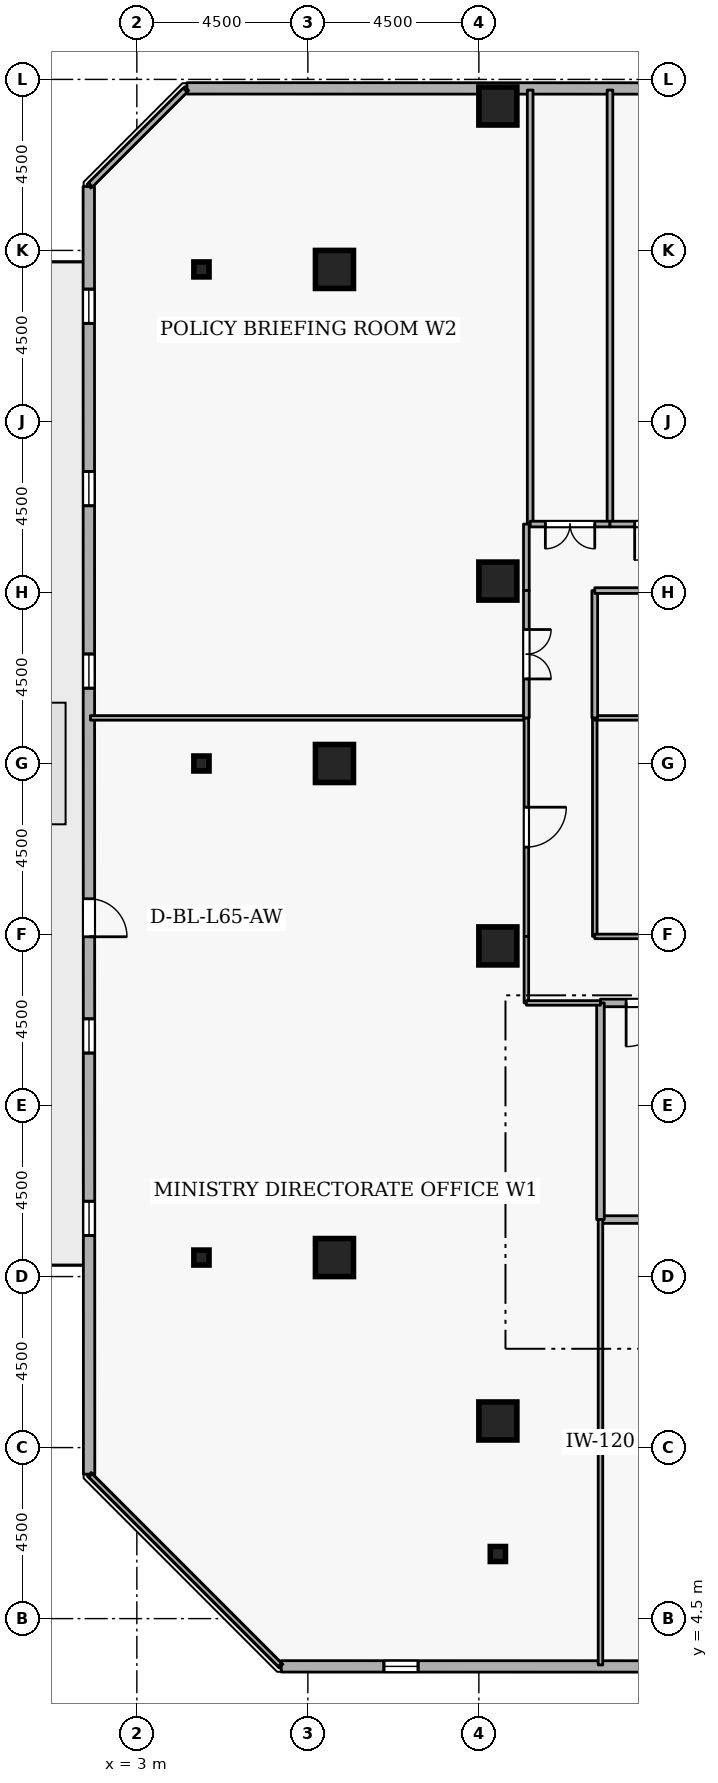
"""IFC4 building model, lengths in metres.
Left out: names, types, materials, properties, quantities, classifications, styles, units other than length and angle.
Written with IfcOpenShell. Run it as: python <this file> out.ifc"""

import sys

from ifc_helpers import new_model, si_unit, direction, frame, frame_2d, origin, origin_2d, place, context, subcontext, project, spatial, rectangle, i_section, extrude, element, fill, save


model = new_model("IFC4")
c1 = context("Model", 3, precision=1e-05, world=origin(), true_north=direction((0.0, 1.0)))
c2 = subcontext(c1, "Body", "Model", "MODEL_VIEW")
j1 = project(units=[si_unit("LENGTHUNIT", "METRE"), si_unit("PLANEANGLEUNIT", "RADIAN")], contexts=[c1])
p1 = place(None, origin())
s1 = spatial("IfcSite", under=j1, at=p1, CompositionType="ELEMENT")
p2 = place(p1, origin())
s2 = spatial("IfcBuilding", under=s1, at=p2, CompositionType="ELEMENT")
p3 = place(p2, frame((0.0, 0.0, 243.9)))
s3 = spatial("IfcBuildingStorey", under=s2, at=p3, CompositionType="ELEMENT", Elevation=243.9)
for number, where, z_axis, x_axis in (
    (1, (12.5, 9.7, 0.0), (0.0, 0.0, 1.0), (1.0, 0.0, 0.0)),
    (2, (12.5, 44.3, 0.0), (0.0, 0.0, 1.0), (1.0, 0.0, 0.0)),
    (3, (8.2, 14.0, 0.0), (0.0, 0.0, 1.0), (1.0, 0.0, 0.0)),
    (4, (8.2, 27.0, 0.0), (0.0, 0.0, 1.0), (1.0, 0.0, 0.0)),
    (5, (8.2, 40.0, 0.0), (0.0, 0.0, 1.0), (1.0, 0.0, 0.0)),
    (6, (12.5, 22.2, 0.0), (0.0, 0.0, 1.0), (1.0, 0.0, 0.0)),
    (7, (12.5, 31.8, 0.0), (0.0, 0.0, 1.0), (1.0, 0.0, 0.0)),
):
    element("IfcColumn", number, at=place(p3, frame(where, z_axis=z_axis, x_axis=x_axis)), inside=s3, PredefinedType="COLUMN", context=c2, shape_type="SweptSolid", body=[
        extrude(rectangle(XDim=1.0, YDim=1.0, at=origin_2d()), origin(), (0.0, 0.0, 1.0), 3.6),
    ])
for number, where, z_axis, x_axis in (
    (8, (12.5, 6.2, 0.0), (0.0, 0.0, 1.0), (1.0, 0.0, 0.0)),
    (9, (4.7, 14.0, 0.0), (0.0, 0.0, 1.0), (1.0, 0.0, 0.0)),
    (10, (4.7, 27.0, 0.0), (0.0, 0.0, 1.0), (1.0, 0.0, 0.0)),
    (11, (4.7, 40.0, 0.0), (0.0, 0.0, 1.0), (1.0, 0.0, 0.0)),
):
    element("IfcColumn", number, at=place(p3, frame(where, z_axis=z_axis, x_axis=x_axis)), inside=s3, PredefinedType="COLUMN", context=c2, shape_type="SweptSolid", body=[
        extrude(i_section(OverallWidth=0.399, OverallDepth=0.394, WebThickness=0.023, FlangeThickness=0.037, FilletRadius=0.015, at=origin_2d()), origin(), (0.0, 0.0, 1.0), 3.6),
    ])
p4 = place(p3, frame((6.801, 3.244, 0.0), z_axis=(0.0, 0.0, 1.0), x_axis=(0.999999969988, -0.000244999128, 0.0)))
e12 = element("IfcWall", 12, at=p4, inside=s3, PredefinedType="STANDARD", context=c2, shape_type="SweptSolid", body=[
    extrude(rectangle(XDim=33.881, YDim=0.3, at=frame_2d((16.94, 0.0))), origin(), (0.0, 0.0, 1.0), 2.7),
])
p5 = place(p4, frame((2.7, 0.0, 0.72)))
e13 = element("IfcOpeningElement", 13, at=p5, cuts=e12, PredefinedType="OPENING", context=c2, shape_type="SweptSolid", body=[
    extrude(rectangle(XDim=0.9, YDim=1.75, at=frame_2d((0.45, 0.875))), frame((0.0, 0.16, 0.0), z_axis=(0.0, -1.0, 0.0), x_axis=(1.0, 0.0, 0.0)), (0.0, 0.0, 1.0), 0.32),
])
p6 = place(p4, frame((12.3, 0.0, 0.72)))
e14 = element("IfcOpeningElement", 14, at=p6, cuts=e12, PredefinedType="OPENING", context=c2, shape_type="SweptSolid", body=[
    extrude(rectangle(XDim=0.9, YDim=1.75, at=frame_2d((0.45, 0.875))), frame((0.0, 0.16, 0.0), z_axis=(0.0, -1.0, 0.0), x_axis=(1.0, 0.0, 0.0)), (0.0, 0.0, 1.0), 0.32),
])
p7 = place(p4, frame((17.1, 0.0, 0.72)))
e15 = element("IfcOpeningElement", 15, at=p7, cuts=e12, PredefinedType="OPENING", context=c2, shape_type="SweptSolid", body=[
    extrude(rectangle(XDim=0.9, YDim=1.75, at=frame_2d((0.45, 0.875))), frame((0.0, 0.16, 0.0), z_axis=(0.0, -1.0, 0.0), x_axis=(1.0, 0.0, 0.0)), (0.0, 0.0, 1.0), 0.32),
])
p8 = place(p4, frame((21.9, 0.0, 0.72)))
e16 = element("IfcOpeningElement", 16, at=p8, cuts=e12, PredefinedType="OPENING", context=c2, shape_type="SweptSolid", body=[
    extrude(rectangle(XDim=0.9, YDim=1.75, at=frame_2d((0.45, 0.875))), frame((0.0, 0.16, 0.0), z_axis=(0.0, -1.0, 0.0), x_axis=(1.0, 0.0, 0.0)), (0.0, 0.0, 1.0), 0.32),
])
p9 = place(p3, frame((38.199, 44.756, 0.0), z_axis=(0.0, 0.0, 1.0), x_axis=(-0.999999969988, 0.000244999128, 0.0)))
e17 = element("IfcWall", 17, at=p9, inside=s3, PredefinedType="STANDARD", context=c2, shape_type="SweptSolid", body=[
    extrude(rectangle(XDim=33.881, YDim=0.3, at=frame_2d((16.94, 0.0))), origin(), (0.0, 0.0, 1.0), 2.7),
])
p10 = place(p9, frame((2.7, 0.0, 0.72)))
e18 = element("IfcOpeningElement", 18, at=p10, cuts=e17, PredefinedType="OPENING", context=c2, shape_type="SweptSolid", body=[
    extrude(rectangle(XDim=0.9, YDim=1.75, at=frame_2d((0.45, 0.875))), frame((0.0, 0.16, 0.0), z_axis=(0.0, -1.0, 0.0), x_axis=(1.0, 0.0, 0.0)), (0.0, 0.0, 1.0), 0.32),
])
p11 = place(p9, frame((7.5, 0.0, 0.72)))
e19 = element("IfcOpeningElement", 19, at=p11, cuts=e17, PredefinedType="OPENING", context=c2, shape_type="SweptSolid", body=[
    extrude(rectangle(XDim=0.9, YDim=1.75, at=frame_2d((0.45, 0.875))), frame((0.0, 0.16, 0.0), z_axis=(0.0, -1.0, 0.0), x_axis=(1.0, 0.0, 0.0)), (0.0, 0.0, 1.0), 0.32),
])
p12 = place(p9, frame((17.1, 0.0, 0.72)))
e20 = element("IfcOpeningElement", 20, at=p12, cuts=e17, PredefinedType="OPENING", context=c2, shape_type="SweptSolid", body=[
    extrude(rectangle(XDim=0.9, YDim=1.75, at=frame_2d((0.45, 0.875))), frame((0.0, 0.16, 0.0), z_axis=(0.0, -1.0, 0.0), x_axis=(1.0, 0.0, 0.0)), (0.0, 0.0, 1.0), 0.32),
])
p13 = place(p3, frame((1.735, 42.181, 0.0), z_axis=(0.0, 0.0, 1.0), x_axis=(0.000244999128, -0.999999969988, 0.0)))
e21 = element("IfcWall", 21, at=p13, inside=s3, PredefinedType="STANDARD", context=c2, shape_type="SweptSolid", body=[
    extrude(rectangle(XDim=33.881, YDim=0.3, at=frame_2d((16.94, 0.0))), origin(), (0.0, 0.0, 1.0), 2.7),
])
p14 = place(p13, frame((18.74, 0.0, 0.0)))
e22 = element("IfcOpeningElement", 22, at=p14, cuts=e21, PredefinedType="OPENING", context=c2, shape_type="SweptSolid", body=[
    extrude(rectangle(XDim=1.0, YDim=2.08, at=frame_2d((0.5, 1.04))), frame((0.0, 0.16, 0.0), z_axis=(0.0, -1.0, 0.0), x_axis=(1.0, 0.0, 0.0)), (0.0, 0.0, 1.0), 0.32),
])
p15 = place(p13, frame((2.7, 0.0, 0.72)))
e23 = element("IfcOpeningElement", 23, at=p15, cuts=e21, PredefinedType="OPENING", context=c2, shape_type="SweptSolid", body=[
    extrude(rectangle(XDim=0.9, YDim=1.75, at=frame_2d((0.45, 0.875))), frame((0.0, 0.16, 0.0), z_axis=(0.0, -1.0, 0.0), x_axis=(1.0, 0.0, 0.0)), (0.0, 0.0, 1.0), 0.32),
])
p16 = place(p13, frame((7.5, 0.0, 0.72)))
e24 = element("IfcOpeningElement", 24, at=p16, cuts=e21, PredefinedType="OPENING", context=c2, shape_type="SweptSolid", body=[
    extrude(rectangle(XDim=0.9, YDim=1.75, at=frame_2d((0.45, 0.875))), frame((0.0, 0.16, 0.0), z_axis=(0.0, -1.0, 0.0), x_axis=(1.0, 0.0, 0.0)), (0.0, 0.0, 1.0), 0.32),
])
p17 = place(p13, frame((12.3, 0.0, 0.72)))
e25 = element("IfcOpeningElement", 25, at=p17, cuts=e21, PredefinedType="OPENING", context=c2, shape_type="SweptSolid", body=[
    extrude(rectangle(XDim=0.9, YDim=1.75, at=frame_2d((0.45, 0.875))), frame((0.0, 0.16, 0.0), z_axis=(0.0, -1.0, 0.0), x_axis=(1.0, 0.0, 0.0)), (0.0, 0.0, 1.0), 0.32),
])
p18 = place(p13, frame((21.9, 0.0, 0.72)))
e26 = element("IfcOpeningElement", 26, at=p18, cuts=e21, PredefinedType="OPENING", context=c2, shape_type="SweptSolid", body=[
    extrude(rectangle(XDim=0.9, YDim=1.75, at=frame_2d((0.45, 0.875))), frame((0.0, 0.16, 0.0), z_axis=(0.0, -1.0, 0.0), x_axis=(1.0, 0.0, 0.0)), (0.0, 0.0, 1.0), 0.32),
])
p19 = place(p13, frame((26.7, 0.0, 0.72)))
e27 = element("IfcOpeningElement", 27, at=p19, cuts=e21, PredefinedType="OPENING", context=c2, shape_type="SweptSolid", body=[
    extrude(rectangle(XDim=0.9, YDim=1.75, at=frame_2d((0.45, 0.875))), frame((0.0, 0.16, 0.0), z_axis=(0.0, -1.0, 0.0), x_axis=(1.0, 0.0, 0.0)), (0.0, 0.0, 1.0), 0.32),
])
p20 = place(p3, frame((15.2, 15.0, 0.0), z_axis=(0.0, 0.0, 1.0), x_axis=(1.0, 0.0, 0.0)))
e28 = element("IfcWall", 28, at=p20, inside=s3, PredefinedType="STANDARD", context=c2, shape_type="SweptSolid", body=[
    extrude(rectangle(XDim=2.5, YDim=0.2, at=frame_2d((1.25, 0.0))), origin(), (0.0, 0.0, 1.0), 3.34),
])
p21 = place(p3, frame((17.7, 20.7, 0.0), z_axis=(0.0, 0.0, 1.0), x_axis=(-1.0, 0.0, 0.0)))
e29 = element("IfcWall", 29, at=p21, inside=s3, PredefinedType="STANDARD", context=c2, shape_type="SweptSolid", body=[
    extrude(rectangle(XDim=2.5, YDim=0.2, at=frame_2d((1.25, 0.0))), origin(), (0.0, 0.0, 1.0), 3.34),
])
p22 = place(p21, frame((0.675, 0.0, 0.0)))
e30 = element("IfcOpeningElement", 30, at=p22, cuts=e29, PredefinedType="OPENING", context=c2, shape_type="SweptSolid", body=[
    extrude(rectangle(XDim=1.15, YDim=2.1, at=frame_2d((0.575, 1.05))), frame((0.0, 0.11, 0.0), z_axis=(0.0, -1.0, 0.0), x_axis=(1.0, 0.0, 0.0)), (0.0, 0.0, 1.0), 0.22),
])
p23 = place(p3, frame((15.2, 20.7, 0.0), z_axis=(0.0, 0.0, 1.0), x_axis=(0.0, -1.0, 0.0)))
e31 = element("IfcWall", 31, at=p23, inside=s3, PredefinedType="STANDARD", context=c2, shape_type="SweptSolid", body=[
    extrude(rectangle(XDim=5.7, YDim=0.2, at=frame_2d((2.85, 0.0))), origin(), (0.0, 0.0, 1.0), 3.34),
])
for number, where, z_axis, x_axis in (
    (32, (13.35, 33.3, 0.0), (0.0, 0.0, 1.0), (0.0, 1.0, 0.0)),
    (33, (15.45, 44.72, 0.0), (0.0, 0.0, 1.0), (0.0, -1.0, 0.0)),
):
    element("IfcWall", number, at=place(p3, frame(where, z_axis=z_axis, x_axis=x_axis)), inside=s3, PredefinedType="PARTITIONING", context=c2, shape_type="SweptSolid", body=[
        extrude(rectangle(XDim=11.42, YDim=0.15, at=frame_2d((5.71, 0.0))), origin(), (0.0, 0.0, 1.0), 3.34),
    ])
p24 = place(p3, frame((15.45, 33.3, 0.0), z_axis=(0.0, 0.0, 1.0), x_axis=(-1.0, 0.0, 0.0)))
e34 = element("IfcWall", 34, at=p24, inside=s3, PredefinedType="PARTITIONING", context=c2, shape_type="SweptSolid", body=[
    extrude(rectangle(XDim=2.1, YDim=0.15, at=frame_2d((1.05, 0.0))), origin(), (0.0, 0.0, 1.0), 3.34),
])
p25 = place(p24, frame((0.4, 0.0, 0.0)))
e35 = element("IfcOpeningElement", 35, at=p25, cuts=e34, PredefinedType="OPENING", context=c2, shape_type="SweptSolid", body=[
    extrude(rectangle(XDim=1.3, YDim=2.12, at=frame_2d((0.65, 1.06))), frame((0.0, 0.085, 0.0), z_axis=(0.0, -1.0, 0.0), x_axis=(1.0, 0.0, 0.0)), (0.0, 0.0, 1.0), 0.17),
])
p26 = place(p3, frame((17.7, 33.3, 0.0), z_axis=(0.0, 0.0, 1.0), x_axis=(-1.0, 0.0, 0.0)))
e36 = element("IfcWall", 36, at=p26, inside=s3, PredefinedType="PARTITIONING", context=c2, shape_type="SweptSolid", body=[
    extrude(rectangle(XDim=2.25, YDim=0.15, at=frame_2d((1.125, 0.0))), origin(), (0.0, 0.0, 1.0), 3.34),
])
p27 = place(p26, frame((0.65, 0.0, 0.0)))
e37 = element("IfcOpeningElement", 37, at=p27, cuts=e36, PredefinedType="OPENING", context=c2, shape_type="SweptSolid", body=[
    extrude(rectangle(XDim=0.95, YDim=2.1, at=frame_2d((0.475, 1.05))), frame((0.0, 0.085, 0.0), z_axis=(0.0, -1.0, 0.0), x_axis=(1.0, 0.0, 0.0)), (0.0, 0.0, 1.0), 0.17),
])
p28 = place(p3, frame((13.25, 22.45, 0.0), z_axis=(0.0, 0.0, 1.0), x_axis=(0.0, -1.0, 0.0)))
e38 = element("IfcWall", 38, at=p28, inside=s3, PredefinedType="PARTITIONING", context=c2, shape_type="SweptSolid", body=[
    extrude(rectangle(XDim=1.75, YDim=0.12, at=frame_2d((0.875, 0.0))), origin(), (0.0, 0.0, 1.0), 3.34),
])
p29 = place(p3, frame((13.25, 20.7, 0.0), z_axis=(0.0, 0.0, 1.0), x_axis=(1.0, 0.0, 0.0)))
e39 = element("IfcWall", 39, at=p29, inside=s3, PredefinedType="PARTITIONING", context=c2, shape_type="SweptSolid", body=[
    extrude(rectangle(XDim=1.95, YDim=0.12, at=frame_2d((0.975, 0.0))), origin(), (0.0, 0.0, 1.0), 3.34),
])
p30 = place(p3, frame((15.2, 15.0, 0.0), z_axis=(0.0, 0.0, 1.0), x_axis=(0.0, -1.0, 0.0)))
e40 = element("IfcWall", 40, at=p30, inside=s3, PredefinedType="PARTITIONING", context=c2, shape_type="SweptSolid", body=[
    extrude(rectangle(XDim=11.72, YDim=0.12, at=frame_2d((5.86, 0.0))), origin(), (0.0, 0.0, 1.0), 3.34),
])
p31 = place(p3, frame((6.767, 3.28, 0.0), z_axis=(0.0, 0.0, 1.0), x_axis=(-0.707106781187, 0.707106781187, 0.0)))
e41 = element("IfcWall", 41, at=p31, inside=s3, PredefinedType="PARTITIONING", context=c2, shape_type="SweptSolid", body=[
    extrude(rectangle(XDim=7.052, YDim=0.12, at=frame_2d((3.526, 0.0))), origin(), (0.0, 0.0, 1.0), 3.34),
])
p32 = place(p3, frame((1.78, 28.2, 0.0), z_axis=(0.0, 0.0, 1.0), x_axis=(1.0, 0.0, 0.0)))
e42 = element("IfcWall", 42, at=p32, inside=s3, PredefinedType="PARTITIONING", context=c2, shape_type="SweptSolid", body=[
    extrude(rectangle(XDim=11.47, YDim=0.12, at=frame_2d((5.735, 0.0))), origin(), (0.0, 0.0, 1.0), 3.34),
])
p33 = place(p3, frame((13.25, 28.2, 0.0), z_axis=(0.0, 0.0, 1.0), x_axis=(0.0, -1.0, 0.0)))
e43 = element("IfcWall", 43, at=p33, inside=s3, PredefinedType="PARTITIONING", context=c2, shape_type="SweptSolid", body=[
    extrude(rectangle(XDim=5.75, YDim=0.12, at=frame_2d((2.875, 0.0))), origin(), (0.0, 0.0, 1.0), 3.34),
])
p34 = place(p33, frame((2.35, 0.0, 0.0)))
e44 = element("IfcOpeningElement", 44, at=p34, cuts=e43, PredefinedType="OPENING", context=c2, shape_type="SweptSolid", body=[
    extrude(rectangle(XDim=1.05, YDim=2.1, at=frame_2d((0.525, 1.05))), frame((0.0, 0.07, 0.0), z_axis=(0.0, -1.0, 0.0), x_axis=(1.0, 0.0, 0.0)), (0.0, 0.0, 1.0), 0.14),
])
p35 = place(p3, frame((1.78, 42.225, 0.0), z_axis=(0.0, 0.0, 1.0), x_axis=(0.707106781187, 0.707106781187, 0.0)))
e45 = element("IfcWall", 45, at=p35, inside=s3, PredefinedType="PARTITIONING", context=c2, shape_type="SweptSolid", body=[
    extrude(rectangle(XDim=3.528, YDim=0.15, at=frame_2d((1.764, 0.0))), origin(), (0.0, 0.0, 1.0), 3.34),
])
p36 = place(p3, frame((13.25, 33.3, 0.0), z_axis=(0.0, 0.0, 1.0), x_axis=(0.0, -1.0, 0.0)))
e46 = element("IfcWall", 46, at=p36, inside=s3, PredefinedType="PARTITIONING", context=c2, shape_type="SweptSolid", body=[
    extrude(rectangle(XDim=1.75, YDim=0.15, at=frame_2d((0.875, 0.0))), origin(), (0.0, 0.0, 1.0), 3.34),
])
p37 = place(p3, frame((13.25, 31.55, 0.0), z_axis=(0.0, 0.0, 1.0), x_axis=(0.0, -1.0, 0.0)))
e47 = element("IfcWall", 47, at=p37, inside=s3, PredefinedType="PARTITIONING", context=c2, shape_type="SweptSolid", body=[
    extrude(rectangle(XDim=3.35, YDim=0.15, at=frame_2d((1.675, 0.0))), origin(), (0.0, 0.0, 1.0), 3.34),
])
p38 = place(p37, frame((1.025, 0.0, 0.0)))
e48 = element("IfcOpeningElement", 48, at=p38, cuts=e47, PredefinedType="OPENING", context=c2, shape_type="SweptSolid", body=[
    extrude(rectangle(XDim=1.3, YDim=2.12, at=frame_2d((0.65, 1.06))), frame((0.0, 0.085, 0.0), z_axis=(0.0, -1.0, 0.0), x_axis=(1.0, 0.0, 0.0)), (0.0, 0.0, 1.0), 0.17),
])
p39 = place(p3, frame((15.05, 22.45, 0.0), z_axis=(0.0, 0.0, 1.0), x_axis=(0.0, 1.0, 0.0)))
e49 = element("IfcWall", 49, at=p39, inside=s3, PredefinedType="PARTITIONING", context=c2, shape_type="SweptSolid", body=[
    extrude(rectangle(XDim=5.75, YDim=0.12, at=frame_2d((2.875, 0.0))), origin(), (0.0, 0.0, 1.0), 3.34),
])
p40 = place(p3, frame((15.05, 28.2, 0.0), z_axis=(0.0, 0.0, 1.0), x_axis=(1.0, 0.0, 0.0)))
e50 = element("IfcWall", 50, at=p40, inside=s3, PredefinedType="PARTITIONING", context=c2, shape_type="SweptSolid", body=[
    extrude(rectangle(XDim=5.85, YDim=0.12, at=frame_2d((2.925, 0.0))), origin(), (0.0, 0.0, 1.0), 3.34),
])
p41 = place(p3, frame((20.9, 22.45, 0.0), z_axis=(0.0, 0.0, 1.0), x_axis=(-1.0, 0.0, 0.0)))
e51 = element("IfcWall", 51, at=p41, inside=s3, PredefinedType="PARTITIONING", context=c2, shape_type="SweptSolid", body=[
    extrude(rectangle(XDim=5.85, YDim=0.12, at=frame_2d((2.925, 0.0))), origin(), (0.0, 0.0, 1.0), 3.34),
])
p42 = place(p41, frame((2.45, 0.0, 0.0)))
e52 = element("IfcOpeningElement", 52, at=p42, cuts=e51, PredefinedType="OPENING", context=c2, shape_type="SweptSolid", body=[
    extrude(rectangle(XDim=0.95, YDim=2.1, at=frame_2d((0.475, 1.05))), frame((0.0, 0.07, 0.0), z_axis=(0.0, -1.0, 0.0), x_axis=(1.0, 0.0, 0.0)), (0.0, 0.0, 1.0), 0.14),
])
p43 = place(p3, frame((15.05, 28.2, 0.0), z_axis=(0.0, 0.0, 1.0), x_axis=(0.0, 1.0, 0.0)))
e53 = element("IfcWall", 53, at=p43, inside=s3, PredefinedType="PARTITIONING", context=c2, shape_type="SweptSolid", body=[
    extrude(rectangle(XDim=3.35, YDim=0.15, at=frame_2d((1.675, 0.0))), origin(), (0.0, 0.0, 1.0), 3.34),
])
p44 = place(p3, frame((15.05, 31.55, 0.0), z_axis=(0.0, 0.0, 1.0), x_axis=(1.0, 0.0, 0.0)))
e54 = element("IfcWall", 54, at=p44, inside=s3, PredefinedType="PARTITIONING", context=c2, shape_type="SweptSolid", body=[
    extrude(rectangle(XDim=5.85, YDim=0.15, at=frame_2d((2.925, 0.0))), origin(), (0.0, 0.0, 1.0), 3.34),
])
p45 = place(p44, frame((2.275, 0.0, 0.0)))
e55 = element("IfcOpeningElement", 55, at=p45, cuts=e54, PredefinedType="OPENING", context=c2, shape_type="SweptSolid", body=[
    extrude(rectangle(XDim=1.3, YDim=2.12, at=frame_2d((0.65, 1.06))), frame((0.0, 0.085, 0.0), z_axis=(0.0, -1.0, 0.0), x_axis=(1.0, 0.0, 0.0)), (0.0, 0.0, 1.0), 0.17),
])
p46 = place(p5, origin())
e56 = element("IfcWindow", 56, at=p46, inside=s3, PartitioningType="SINGLE_PANEL", PredefinedType="WINDOW", context=c2, shape_type="SweptSolid", body=[
    extrude(rectangle(XDim=0.9, YDim=1.75, at=frame_2d((0.45, 0.875))), frame((0.0, 0.03, 0.0), z_axis=(0.0, -1.0, 0.0), x_axis=(1.0, 0.0, 0.0)), (0.0, 0.0, 1.0), 0.06),
])
fill(e13, e56)
p47 = place(p14, origin())
e57 = element("IfcDoor", 57, at=p47, inside=s3, OperationType="SINGLE_SWING_RIGHT", PredefinedType="DOOR", context=c2, shape_type="SweptSolid", body=[
    extrude(rectangle(XDim=1.0, YDim=2.08, at=frame_2d((0.5, 1.04))), frame((0.0, 0.025, 0.0), z_axis=(0.0, -1.0, 0.0), x_axis=(1.0, 0.0, 0.0)), (0.0, 0.0, 1.0), 0.05),
])
fill(e22, e57)
p48 = place(p15, origin())
e58 = element("IfcWindow", 58, at=p48, inside=s3, PartitioningType="SINGLE_PANEL", PredefinedType="WINDOW", context=c2, shape_type="SweptSolid", body=[
    extrude(rectangle(XDim=0.9, YDim=1.75, at=frame_2d((0.45, 0.875))), frame((0.0, 0.03, 0.0), z_axis=(0.0, -1.0, 0.0), x_axis=(1.0, 0.0, 0.0)), (0.0, 0.0, 1.0), 0.06),
])
fill(e23, e58)
p49 = place(p16, origin())
e59 = element("IfcWindow", 59, at=p49, inside=s3, PartitioningType="SINGLE_PANEL", PredefinedType="WINDOW", context=c2, shape_type="SweptSolid", body=[
    extrude(rectangle(XDim=0.9, YDim=1.75, at=frame_2d((0.45, 0.875))), frame((0.0, 0.03, 0.0), z_axis=(0.0, -1.0, 0.0), x_axis=(1.0, 0.0, 0.0)), (0.0, 0.0, 1.0), 0.06),
])
fill(e24, e59)
p50 = place(p17, origin())
e60 = element("IfcWindow", 60, at=p50, inside=s3, PartitioningType="SINGLE_PANEL", PredefinedType="WINDOW", context=c2, shape_type="SweptSolid", body=[
    extrude(rectangle(XDim=0.9, YDim=1.75, at=frame_2d((0.45, 0.875))), frame((0.0, 0.03, 0.0), z_axis=(0.0, -1.0, 0.0), x_axis=(1.0, 0.0, 0.0)), (0.0, 0.0, 1.0), 0.06),
])
fill(e25, e60)
p51 = place(p18, origin())
e61 = element("IfcWindow", 61, at=p51, inside=s3, PartitioningType="SINGLE_PANEL", PredefinedType="WINDOW", context=c2, shape_type="SweptSolid", body=[
    extrude(rectangle(XDim=0.9, YDim=1.75, at=frame_2d((0.45, 0.875))), frame((0.0, 0.03, 0.0), z_axis=(0.0, -1.0, 0.0), x_axis=(1.0, 0.0, 0.0)), (0.0, 0.0, 1.0), 0.06),
])
fill(e26, e61)
p52 = place(p19, origin())
e62 = element("IfcWindow", 62, at=p52, inside=s3, PartitioningType="SINGLE_PANEL", PredefinedType="WINDOW", context=c2, shape_type="SweptSolid", body=[
    extrude(rectangle(XDim=0.9, YDim=1.75, at=frame_2d((0.45, 0.875))), frame((0.0, 0.03, 0.0), z_axis=(0.0, -1.0, 0.0), x_axis=(1.0, 0.0, 0.0)), (0.0, 0.0, 1.0), 0.06),
])
fill(e27, e62)
p53 = place(p22, origin())
e63 = element("IfcDoor", 63, at=p53, inside=s3, OperationType="SINGLE_SWING_RIGHT", PredefinedType="DOOR", context=c2, shape_type="SweptSolid", body=[
    extrude(rectangle(XDim=1.15, YDim=2.1, at=frame_2d((0.575, 1.05))), frame((0.0, 0.025, 0.0), z_axis=(0.0, -1.0, 0.0), x_axis=(1.0, 0.0, 0.0)), (0.0, 0.0, 1.0), 0.05),
])
fill(e30, e63)
p54 = place(p25, origin())
e64 = element("IfcDoor", 64, at=p54, inside=s3, OperationType="DOUBLE_DOOR_SINGLE_SWING", PredefinedType="DOOR", context=c2, shape_type="SweptSolid", body=[
    extrude(rectangle(XDim=1.3, YDim=2.12, at=frame_2d((0.65, 1.06))), frame((0.0, 0.025, 0.0), z_axis=(0.0, -1.0, 0.0), x_axis=(1.0, 0.0, 0.0)), (0.0, 0.0, 1.0), 0.05),
])
fill(e35, e64)
p55 = place(p27, origin())
e65 = element("IfcDoor", 65, at=p55, inside=s3, OperationType="SINGLE_SWING_RIGHT", PredefinedType="DOOR", context=c2, shape_type="SweptSolid", body=[
    extrude(rectangle(XDim=0.95, YDim=2.1, at=frame_2d((0.475, 1.05))), frame((0.0, 0.025, 0.0), z_axis=(0.0, -1.0, 0.0), x_axis=(1.0, 0.0, 0.0)), (0.0, 0.0, 1.0), 0.05),
])
fill(e37, e65)
p56 = place(p34, origin())
e66 = element("IfcDoor", 66, at=p56, inside=s3, OperationType="SINGLE_SWING_LEFT", PredefinedType="DOOR", context=c2, shape_type="SweptSolid", body=[
    extrude(rectangle(XDim=1.05, YDim=2.1, at=frame_2d((0.525, 1.05))), frame((0.0, 0.025, 0.0), z_axis=(0.0, -1.0, 0.0), x_axis=(1.0, 0.0, 0.0)), (0.0, 0.0, 1.0), 0.05),
])
fill(e44, e66)
p57 = place(p38, origin())
e67 = element("IfcDoor", 67, at=p57, inside=s3, OperationType="DOUBLE_DOOR_SINGLE_SWING", PredefinedType="DOOR", context=c2, shape_type="SweptSolid", body=[
    extrude(rectangle(XDim=1.3, YDim=2.12, at=frame_2d((0.65, 1.06))), frame((0.0, 0.025, 0.0), z_axis=(0.0, -1.0, 0.0), x_axis=(1.0, 0.0, 0.0)), (0.0, 0.0, 1.0), 0.05),
])
fill(e48, e67)
save(model, sys.argv[1])
